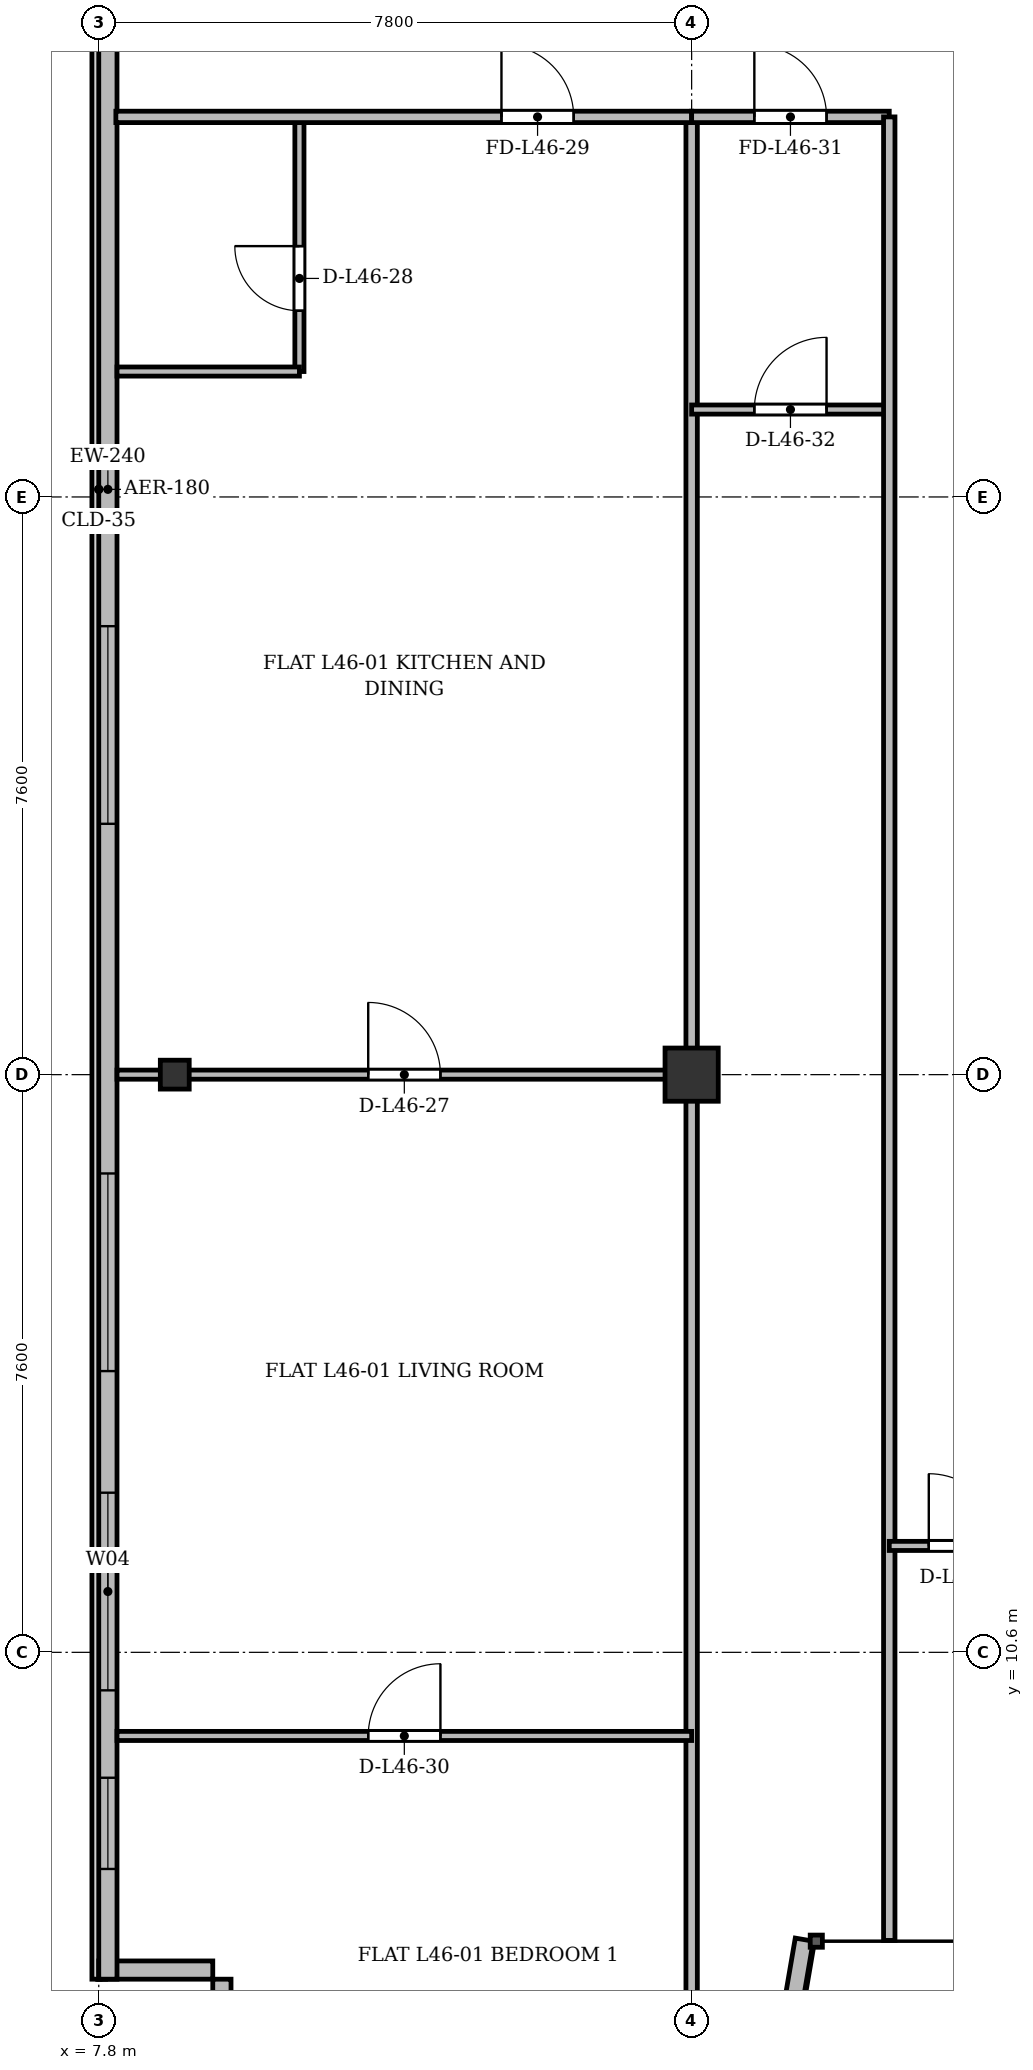
"""IFC4 building model, lengths in metres.
Left out: names, types, materials, properties, quantities, classifications, styles, units other than length and angle.
Written with IfcOpenShell. Run it as: python <this file> out.ifc"""

import sys

from ifc_helpers import new_model, si_unit, direction, frame, frame_2d, origin, origin_2d, place, context, subcontext, project, spatial, rectangle, i_section, extrude, source, transform, mapped, element, fill, save


model = new_model("IFC4")
c1 = context("Model", 3, precision=1e-05, world=origin(), true_north=direction((0.0, 1.0)))
c2 = subcontext(c1, "Body", "Model", "MODEL_VIEW")
j1 = project(units=[si_unit("LENGTHUNIT", "METRE"), si_unit("PLANEANGLEUNIT", "RADIAN")], contexts=[c1])
p1 = place(None, origin())
s1 = spatial("IfcSite", under=j1, at=p1, CompositionType="ELEMENT")
p2 = place(p1, origin())
s2 = spatial("IfcBuilding", under=s1, at=p2, CompositionType="ELEMENT")
p3 = place(p2, frame((0.0, 0.0, 175.3)))
s3 = spatial("IfcBuildingStorey", under=s2, at=p3, CompositionType="ELEMENT", Elevation=175.3)
m1 = source(origin(), c2, "Body", "SweptSolid", [
    extrude(i_section(OverallWidth=0.38, OverallDepth=0.38, WebThickness=0.02, FlangeThickness=0.03, at=origin_2d()), origin(), (0.0, 0.0, 1.0), 3.6),
])
p4 = place(p3, frame((8.8, 18.2, 0.0), z_axis=(0.0, 0.0, 1.0), x_axis=(1.0, 0.0, 0.0)))
e1 = element("IfcColumn", 1, at=p4, inside=s3, PredefinedType="COLUMN", context=c2, shape_type="MappedRepresentation", body=[
    mapped(m1, transform((0.0, 0.0, 0.0), x_axis=(1.0, 0.0, 0.0), y_axis=(0.0, 1.0, 0.0), z_axis=(0.0, 0.0, 1.0), scale=1.0)),
])
m2 = source(origin(), c2, "Body", "SweptSolid", [
    extrude(rectangle(XDim=0.7, YDim=0.7, at=origin_2d()), origin(), (0.0, 0.0, 1.0), 3.6),
])
p5 = place(p3, frame((15.6, 18.2, 0.0), z_axis=(0.0, 0.0, 1.0), x_axis=(1.0, 0.0, 0.0)))
e2 = element("IfcColumn", 2, at=p5, inside=s3, PredefinedType="COLUMN", context=c2, shape_type="MappedRepresentation", body=[
    mapped(m2, transform((0.0, 0.0, 0.0), x_axis=(1.0, 0.0, 0.0), y_axis=(0.0, 1.0, 0.0), z_axis=(0.0, 0.0, 1.0), scale=1.0)),
])
p6 = place(p3, frame((9.42, 4.8, 0.0), z_axis=(0.0, 0.0, 1.0), x_axis=(0.0, 1.0, 0.0)))
e3 = element("IfcWall", 3, at=p6, inside=s3, PredefinedType="SOLIDWALL", context=c2, shape_type="SweptSolid", body=[
    extrude(rectangle(XDim=1.5, YDim=0.24, at=frame_2d((0.75, 0.0))), origin(), (0.0, 0.0, 1.0), 3.35),
])
p7 = place(p3, frame((9.3, 6.42, 0.0), z_axis=(0.0, 0.0, 1.0), x_axis=(-1.0, 0.0, 0.0)))
e4 = element("IfcWall", 4, at=p7, inside=s3, PredefinedType="SOLIDWALL", context=c2, shape_type="SweptSolid", body=[
    extrude(rectangle(XDim=1.5, YDim=0.24, at=frame_2d((0.75, 0.0))), origin(), (0.0, 0.0, 1.0), 2.85),
])
p8 = place(p3, frame((7.92, 6.3, 0.0), z_axis=(0.0, 0.0, 1.0), x_axis=(0.0, 1.0, 0.0)))
e5 = element("IfcWall", 5, at=p8, inside=s3, PredefinedType="SOLIDWALL", context=c2, shape_type="SweptSolid", body=[
    extrude(rectangle(XDim=39.2, YDim=0.24, at=frame_2d((19.6, 0.0))), origin(), (0.0, 0.0, 1.0), 3.35),
])
p9 = place(p8, frame((1.45, 0.0, 0.92)))
e6 = element("IfcOpeningElement", 6, at=p9, cuts=e5, PredefinedType="OPENING", context=c2, shape_type="SweptSolid", body=[
    extrude(rectangle(XDim=1.2, YDim=1.65, at=frame_2d((0.6, 0.825))), frame((0.0, 0.13, 0.0), z_axis=(0.0, -1.0, 0.0), x_axis=(1.0, 0.0, 0.0)), (0.0, 0.0, 1.0), 0.26),
])
p10 = place(p8, frame((3.8, 0.0, 0.92)))
e7 = element("IfcOpeningElement", 7, at=p10, cuts=e5, PredefinedType="OPENING", context=c2, shape_type="SweptSolid", body=[
    extrude(rectangle(XDim=2.6, YDim=1.9, at=frame_2d((1.3, 0.95))), frame((0.0, 0.13, 0.0), z_axis=(0.0, -1.0, 0.0), x_axis=(1.0, 0.0, 0.0)), (0.0, 0.0, 1.0), 0.26),
])
p11 = place(p8, frame((8.0, 0.0, 0.92)))
e8 = element("IfcOpeningElement", 8, at=p11, cuts=e5, PredefinedType="OPENING", context=c2, shape_type="SweptSolid", body=[
    extrude(rectangle(XDim=2.6, YDim=1.9, at=frame_2d((1.3, 0.95))), frame((0.0, 0.13, 0.0), z_axis=(0.0, -1.0, 0.0), x_axis=(1.0, 0.0, 0.0)), (0.0, 0.0, 1.0), 0.26),
])
p12 = place(p8, frame((15.2, 0.0, 0.92)))
e9 = element("IfcOpeningElement", 9, at=p12, cuts=e5, PredefinedType="OPENING", context=c2, shape_type="SweptSolid", body=[
    extrude(rectangle(XDim=2.6, YDim=1.9, at=frame_2d((1.3, 0.95))), frame((0.0, 0.13, 0.0), z_axis=(0.0, -1.0, 0.0), x_axis=(1.0, 0.0, 0.0)), (0.0, 0.0, 1.0), 0.26),
])
p13 = place(p8, frame((33.5, 0.0, 0.92)))
e10 = element("IfcOpeningElement", 10, at=p13, cuts=e5, PredefinedType="OPENING", context=c2, shape_type="SweptSolid", body=[
    extrude(rectangle(XDim=1.2, YDim=1.65, at=frame_2d((0.6, 0.825))), frame((0.0, 0.13, 0.0), z_axis=(0.0, -1.0, 0.0), x_axis=(1.0, 0.0, 0.0)), (0.0, 0.0, 1.0), 0.26),
])
p14 = place(p8, frame((36.85, 0.0, 0.92)))
e11 = element("IfcOpeningElement", 11, at=p14, cuts=e5, PredefinedType="OPENING", context=c2, shape_type="SweptSolid", body=[
    extrude(rectangle(XDim=1.2, YDim=1.65, at=frame_2d((0.6, 0.825))), frame((0.0, 0.13, 0.0), z_axis=(0.0, -1.0, 0.0), x_axis=(1.0, 0.0, 0.0)), (0.0, 0.0, 1.0), 0.26),
])
p15 = place(p3, frame((17.082, 6.82, 0.0), z_axis=(0.0, 0.0, 1.0), x_axis=(-0.168990530437, -0.98561767467, 0.0)))
e12 = element("IfcWall", 12, at=p15, inside=s3, PredefinedType="SOLIDWALL", context=c2, shape_type="SweptSolid", body=[
    extrude(rectangle(XDim=3.551, YDim=0.24, at=frame_2d((1.775, 0.0))), origin(), (0.0, 0.0, 1.0), 2.75),
])
p16 = place(p3, frame((15.6, 3.525, 0.0), z_axis=(0.0, 0.0, 1.0), x_axis=(0.0, 1.0, 0.0)))
e13 = element("IfcWall", 13, at=p16, inside=s3, PredefinedType="PARTITIONING", context=c2, shape_type="SweptSolid", body=[
    extrude(rectangle(XDim=27.275, YDim=0.15, at=frame_2d((13.638, 0.0))), origin(), (0.0, 0.0, 1.0), 2.85),
])
p17 = place(p3, frame((8.04, 18.2, 0.0), z_axis=(0.0, 0.0, 1.0), x_axis=(1.0, 0.0, 0.0)))
e14 = element("IfcWall", 14, at=p17, inside=s3, PredefinedType="PARTITIONING", context=c2, shape_type="SweptSolid", body=[
    extrude(rectangle(XDim=7.56, YDim=0.12, at=frame_2d((3.78, 0.0))), origin(), (0.0, 0.0, 1.0), 2.75),
])
p18 = place(p17, frame((3.305, 0.0, 0.0)))
e15 = element("IfcOpeningElement", 15, at=p18, cuts=e14, PredefinedType="OPENING", context=c2, shape_type="SweptSolid", body=[
    extrude(rectangle(XDim=0.95, YDim=2.15, at=frame_2d((0.475, 1.075))), frame((0.0, 0.07, 0.0), z_axis=(0.0, -1.0, 0.0), x_axis=(1.0, 0.0, 0.0)), (0.0, 0.0, 1.0), 0.14),
])
p19 = place(p3, frame((10.44, 27.45, 0.0), z_axis=(0.0, 0.0, 1.0), x_axis=(0.0, 1.0, 0.0)))
e16 = element("IfcWall", 16, at=p19, inside=s3, PredefinedType="PARTITIONING", context=c2, shape_type="SweptSolid", body=[
    extrude(rectangle(XDim=3.35, YDim=0.12, at=frame_2d((1.675, 0.0))), origin(), (0.0, 0.0, 1.0), 3.35),
])
p20 = place(p19, frame((0.8, 0.0, 0.0)))
e17 = element("IfcOpeningElement", 17, at=p20, cuts=e16, PredefinedType="OPENING", context=c2, shape_type="SweptSolid", body=[
    extrude(rectangle(XDim=0.85, YDim=2.1, at=frame_2d((0.425, 1.05))), frame((0.0, 0.07, 0.0), z_axis=(0.0, -1.0, 0.0), x_axis=(1.0, 0.0, 0.0)), (0.0, 0.0, 1.0), 0.14),
])
p21 = place(p3, frame((8.04, 27.45, 0.0), z_axis=(0.0, 0.0, 1.0), x_axis=(1.0, 0.0, 0.0)))
e18 = element("IfcWall", 18, at=p21, inside=s3, PredefinedType="PARTITIONING", context=c2, shape_type="SweptSolid", body=[
    extrude(rectangle(XDim=2.4, YDim=0.12, at=frame_2d((1.2, 0.0))), origin(), (0.0, 0.0, 1.0), 2.85),
])
p22 = place(p3, frame((8.025, 30.8, 0.0), z_axis=(0.0, 0.0, 1.0), x_axis=(1.0, 0.0, 0.0)))
e19 = element("IfcWall", 19, at=p22, inside=s3, PredefinedType="PARTITIONING", context=c2, shape_type="SweptSolid", body=[
    extrude(rectangle(XDim=7.575, YDim=0.15, at=frame_2d((3.788, 0.0))), origin(), (0.0, 0.0, 1.0), 2.85),
])
p23 = place(p22, frame((5.073, 0.0, 0.0)))
e20 = element("IfcOpeningElement", 20, at=p23, cuts=e19, PredefinedType="OPENING", context=c2, shape_type="SweptSolid", body=[
    extrude(rectangle(XDim=0.95, YDim=2.15, at=frame_2d((0.475, 1.075))), frame((0.0, 0.085, 0.0), z_axis=(0.0, -1.0, 0.0), x_axis=(1.0, 0.0, 0.0)), (0.0, 0.0, 1.0), 0.17),
])
p24 = place(p3, frame((8.04, 9.5, 0.0), z_axis=(0.0, 0.0, 1.0), x_axis=(1.0, 0.0, 0.0)))
e21 = element("IfcWall", 21, at=p24, inside=s3, PredefinedType="PARTITIONING", context=c2, shape_type="SweptSolid", body=[
    extrude(rectangle(XDim=7.56, YDim=0.12, at=frame_2d((3.78, 0.0))), origin(), (0.0, 0.0, 1.0), 2.85),
])
p25 = place(p24, frame((3.305, 0.0, 0.0)))
e22 = element("IfcOpeningElement", 22, at=p25, cuts=e21, PredefinedType="OPENING", context=c2, shape_type="SweptSolid", body=[
    extrude(rectangle(XDim=0.95, YDim=2.15, at=frame_2d((0.475, 1.075))), frame((0.0, 0.07, 0.0), z_axis=(0.0, -1.0, 0.0), x_axis=(1.0, 0.0, 0.0)), (0.0, 0.0, 1.0), 0.14),
])
p26 = place(p3, frame((15.6, 30.8, 0.0), z_axis=(0.0, 0.0, 1.0), x_axis=(1.0, 0.0, 0.0)))
e23 = element("IfcWall", 23, at=p26, inside=s3, PredefinedType="PARTITIONING", context=c2, shape_type="SweptSolid", body=[
    extrude(rectangle(XDim=2.6, YDim=0.15, at=frame_2d((1.3, 0.0))), origin(), (0.0, 0.0, 1.0), 2.85),
])
p27 = place(p26, frame((0.825, 0.0, 0.0)))
e24 = element("IfcOpeningElement", 24, at=p27, cuts=e23, PredefinedType="OPENING", context=c2, shape_type="SweptSolid", body=[
    extrude(rectangle(XDim=0.95, YDim=2.15, at=frame_2d((0.475, 1.075))), frame((0.0, 0.085, 0.0), z_axis=(0.0, -1.0, 0.0), x_axis=(1.0, 0.0, 0.0)), (0.0, 0.0, 1.0), 0.17),
])
p28 = place(p3, frame((15.6, 26.95, 0.0), z_axis=(0.0, 0.0, 1.0), x_axis=(1.0, 0.0, 0.0)))
e25 = element("IfcWall", 25, at=p28, inside=s3, PredefinedType="PARTITIONING", context=c2, shape_type="SweptSolid", body=[
    extrude(rectangle(XDim=2.6, YDim=0.12, at=frame_2d((1.3, 0.0))), origin(), (0.0, 0.0, 1.0), 2.85),
])
p29 = place(p28, frame((0.825, 0.0, 0.0)))
e26 = element("IfcOpeningElement", 26, at=p29, cuts=e25, PredefinedType="OPENING", context=c2, shape_type="SweptSolid", body=[
    extrude(rectangle(XDim=0.95, YDim=2.15, at=frame_2d((0.475, 1.075))), frame((0.0, 0.07, 0.0), z_axis=(0.0, -1.0, 0.0), x_axis=(1.0, 0.0, 0.0)), (0.0, 0.0, 1.0), 0.14),
])
p30 = place(p3, frame((18.2, 6.81, 0.0), z_axis=(0.0, 0.0, 1.0), x_axis=(0.0, 1.0, 0.0)))
e27 = element("IfcWall", 27, at=p30, inside=s3, PredefinedType="PARTITIONING", context=c2, shape_type="SweptSolid", body=[
    extrude(rectangle(XDim=23.99, YDim=0.15, at=frame_2d((11.995, 0.0))), origin(), (0.0, 0.0, 1.0), 2.75),
])
p31 = place(p3, frame((18.2, 12.0, 0.0), z_axis=(0.0, 0.0, 1.0), x_axis=(1.0, 0.0, 0.0)))
e28 = element("IfcWall", 28, at=p31, inside=s3, PredefinedType="PARTITIONING", context=c2, shape_type="SweptSolid", body=[
    extrude(rectangle(XDim=2.0, YDim=0.12, at=frame_2d((1.0, 0.0))), origin(), (0.0, 0.0, 1.0), 3.35),
])
p32 = place(p31, frame((0.52, 0.0, 0.0)))
e29 = element("IfcOpeningElement", 29, at=p32, cuts=e28, PredefinedType="OPENING", context=c2, shape_type="SweptSolid", body=[
    extrude(rectangle(XDim=0.95, YDim=2.15, at=frame_2d((0.475, 1.075))), frame((0.0, 0.07, 0.0), z_axis=(0.0, -1.0, 0.0), x_axis=(1.0, 0.0, 0.0)), (0.0, 0.0, 1.0), 0.14),
])
m3 = source(origin(), c2, "Body", "SweptSolid", [
    extrude(rectangle(XDim=1.2, YDim=1.65, at=frame_2d((0.6, 0.825))), frame((0.0, 0.03, 0.0), z_axis=(0.0, -1.0, 0.0), x_axis=(1.0, 0.0, 0.0)), (0.0, 0.0, 1.0), 0.06),
])
p33 = place(p9, origin())
e30 = element("IfcWindow", 30, at=p33, inside=s3, PartitioningType="SINGLE_PANEL", PredefinedType="WINDOW", context=c2, shape_type="MappedRepresentation", body=[
    mapped(m3, transform((0.0, 0.0, 0.0), x_axis=(1.0, 0.0, 0.0), y_axis=(0.0, 1.0, 0.0), z_axis=(0.0, 0.0, 1.0), scale=1.0)),
])
fill(e6, e30)
m4 = source(origin(), c2, "Body", "SweptSolid", [
    extrude(rectangle(XDim=2.6, YDim=1.9, at=frame_2d((1.3, 0.95))), frame((0.0, 0.03, 0.0), z_axis=(0.0, -1.0, 0.0), x_axis=(1.0, 0.0, 0.0)), (0.0, 0.0, 1.0), 0.06),
])
p34 = place(p10, origin())
e31 = element("IfcWindow", 31, at=p34, inside=s3, PartitioningType="SINGLE_PANEL", PredefinedType="WINDOW", context=c2, shape_type="MappedRepresentation", body=[
    mapped(m4, transform((0.0, 0.0, 0.0), x_axis=(1.0, 0.0, 0.0), y_axis=(0.0, 1.0, 0.0), z_axis=(0.0, 0.0, 1.0), scale=1.0)),
])
fill(e7, e31)
p35 = place(p11, origin())
e32 = element("IfcWindow", 32, at=p35, inside=s3, PartitioningType="SINGLE_PANEL", PredefinedType="WINDOW", context=c2, shape_type="MappedRepresentation", body=[
    mapped(m4, transform((0.0, 0.0, 0.0), x_axis=(1.0, 0.0, 0.0), y_axis=(0.0, 1.0, 0.0), z_axis=(0.0, 0.0, 1.0), scale=1.0)),
])
fill(e8, e32)
p36 = place(p12, origin())
e33 = element("IfcWindow", 33, at=p36, inside=s3, PartitioningType="SINGLE_PANEL", PredefinedType="WINDOW", context=c2, shape_type="MappedRepresentation", body=[
    mapped(m4, transform((0.0, 0.0, 0.0), x_axis=(1.0, 0.0, 0.0), y_axis=(0.0, 1.0, 0.0), z_axis=(0.0, 0.0, 1.0), scale=1.0)),
])
fill(e9, e33)
m5 = source(origin(), c2, "Body", "SweptSolid", [
    extrude(rectangle(XDim=0.95, YDim=2.15, at=frame_2d((0.475, 1.075))), frame((0.0, 0.025, 0.0), z_axis=(0.0, -1.0, 0.0), x_axis=(1.0, 0.0, 0.0)), (0.0, 0.0, 1.0), 0.05),
])
p37 = place(p18, origin())
e34 = element("IfcDoor", 34, at=p37, inside=s3, OperationType="SINGLE_SWING_LEFT", PredefinedType="DOOR", context=c2, shape_type="MappedRepresentation", body=[
    mapped(m5, transform((0.0, 0.0, 0.0), x_axis=(1.0, 0.0, 0.0), y_axis=(0.0, 1.0, 0.0), z_axis=(0.0, 0.0, 1.0), scale=1.0)),
])
fill(e15, e34)
m6 = source(origin(), c2, "Body", "SweptSolid", [
    extrude(rectangle(XDim=0.85, YDim=2.1, at=frame_2d((0.425, 1.05))), frame((0.0, 0.025, 0.0), z_axis=(0.0, -1.0, 0.0), x_axis=(1.0, 0.0, 0.0)), (0.0, 0.0, 1.0), 0.05),
])
p38 = place(p20, origin())
e35 = element("IfcDoor", 35, at=p38, inside=s3, OperationType="SINGLE_SWING_RIGHT", PredefinedType="DOOR", context=c2, shape_type="MappedRepresentation", body=[
    mapped(m6, transform((0.0, 0.0, 0.0), x_axis=(1.0, 0.0, 0.0), y_axis=(0.0, 1.0, 0.0), z_axis=(0.0, 0.0, 1.0), scale=1.0)),
])
fill(e17, e35)
p39 = place(p23, origin())
e36 = element("IfcDoor", 36, at=p39, inside=s3, OperationType="SINGLE_SWING_LEFT", PredefinedType="DOOR", context=c2, shape_type="MappedRepresentation", body=[
    mapped(m5, transform((0.0, 0.0, 0.0), x_axis=(1.0, 0.0, 0.0), y_axis=(0.0, 1.0, 0.0), z_axis=(0.0, 0.0, 1.0), scale=1.0)),
])
fill(e20, e36)
p40 = place(p25, origin())
e37 = element("IfcDoor", 37, at=p40, inside=s3, OperationType="SINGLE_SWING_RIGHT", PredefinedType="DOOR", context=c2, shape_type="MappedRepresentation", body=[
    mapped(m5, transform((0.0, 0.0, 0.0), x_axis=(1.0, 0.0, 0.0), y_axis=(0.0, 1.0, 0.0), z_axis=(0.0, 0.0, 1.0), scale=1.0)),
])
fill(e22, e37)
p41 = place(p27, origin())
e38 = element("IfcDoor", 38, at=p41, inside=s3, OperationType="SINGLE_SWING_LEFT", PredefinedType="DOOR", context=c2, shape_type="MappedRepresentation", body=[
    mapped(m5, transform((0.0, 0.0, 0.0), x_axis=(1.0, 0.0, 0.0), y_axis=(0.0, 1.0, 0.0), z_axis=(0.0, 0.0, 1.0), scale=1.0)),
])
fill(e24, e38)
p42 = place(p29, origin())
e39 = element("IfcDoor", 39, at=p42, inside=s3, OperationType="SINGLE_SWING_RIGHT", PredefinedType="DOOR", context=c2, shape_type="MappedRepresentation", body=[
    mapped(m5, transform((0.0, 0.0, 0.0), x_axis=(1.0, 0.0, 0.0), y_axis=(0.0, 1.0, 0.0), z_axis=(0.0, 0.0, 1.0), scale=1.0)),
])
fill(e26, e39)
p43 = place(p32, origin())
e40 = element("IfcDoor", 40, at=p43, inside=s3, OperationType="SINGLE_SWING_LEFT", PredefinedType="DOOR", context=c2, shape_type="MappedRepresentation", body=[
    mapped(m5, transform((0.0, 0.0, 0.0), x_axis=(1.0, 0.0, 0.0), y_axis=(0.0, 1.0, 0.0), z_axis=(0.0, 0.0, 1.0), scale=1.0)),
])
fill(e29, e40)
save(model, sys.argv[1])
